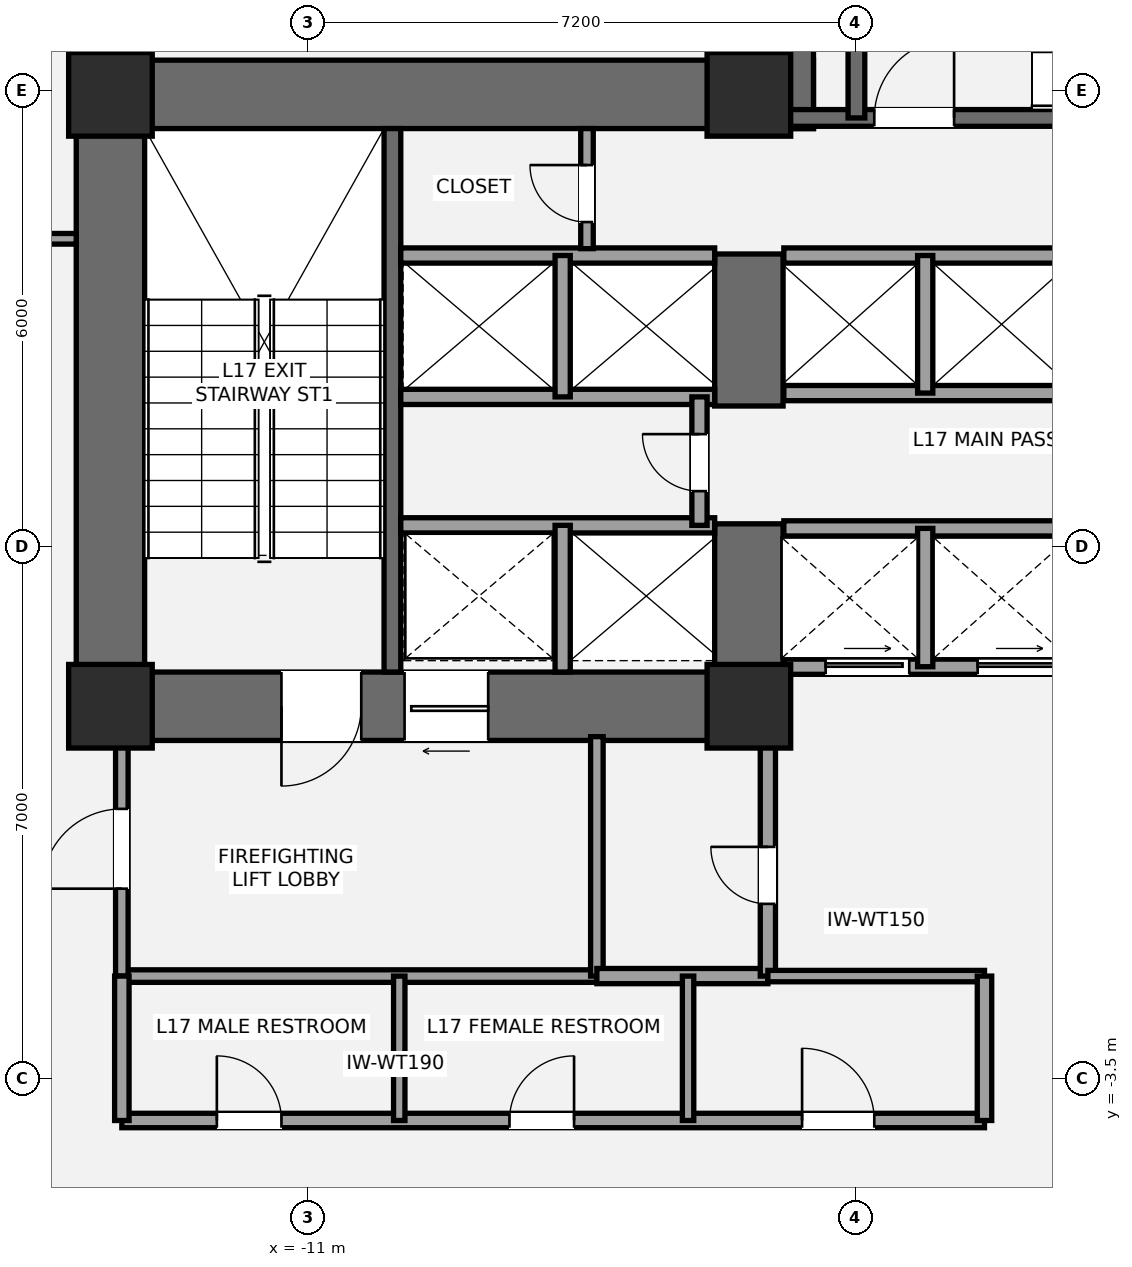
"""IFC4 building model, lengths in metres.
Left out: names, types, materials, properties, quantities, classifications, styles, units other than length and angle.
Written with IfcOpenShell. Run it as: python <this file> out.ifc"""

import sys

from ifc_helpers import new_model, si_unit, direction, frame, frame_2d, origin, origin_2d, place, context, subcontext, project, spatial, rectangle, extrude, element, fill, save


model = new_model("IFC4")
c1 = context("Model", 3, precision=1e-05, world=origin(), true_north=direction((0.0, 1.0)))
c2 = subcontext(c1, "Body", "Model", "MODEL_VIEW")
j1 = project(units=[si_unit("LENGTHUNIT", "METRE"), si_unit("PLANEANGLEUNIT", "RADIAN")], contexts=[c1])
p1 = place(None, origin())
s1 = spatial("IfcSite", under=j1, at=p1, CompositionType="ELEMENT")
p2 = place(p1, origin())
s2 = spatial("IfcBuilding", under=s1, at=p2, CompositionType="ELEMENT")
p3 = place(p2, frame((0.0, 0.0, 66.6)))
s3 = spatial("IfcBuildingStorey", under=s2, at=p3, CompositionType="ELEMENT", Elevation=66.6)
p4 = place(p3, frame((-13.6, 0.95, 0.0), z_axis=(0.0, 0.0, 1.0), x_axis=(0.0, 1.0, 0.0)))
e1 = element("IfcWall", 1, at=p4, inside=s3, PredefinedType="SHEAR", context=c2, shape_type="SweptSolid", body=[
    extrude(rectangle(XDim=8.95, YDim=0.9, at=frame_2d((4.475, 0.0))), origin(), (0.0, 0.0, 1.0), 3.6),
])
p5 = place(p3, frame((-14.05, 9.45, 0.0), z_axis=(0.0, 0.0, 1.0), x_axis=(1.0, 0.0, 0.0)))
e2 = element("IfcWall", 2, at=p5, inside=s3, PredefinedType="SHEAR", context=c2, shape_type="SweptSolid", body=[
    extrude(rectangle(XDim=9.7, YDim=0.9, at=frame_2d((4.85, 0.0))), origin(), (0.0, 0.0, 1.0), 3.6),
])
p6 = place(p3, frame((-4.75, 1.4, 0.0), z_axis=(0.0, 0.0, 1.0), x_axis=(-1.0, 0.0, 0.0)))
e3 = element("IfcWall", 3, at=p6, inside=s3, PredefinedType="SHEAR", context=c2, shape_type="SweptSolid", body=[
    extrude(rectangle(XDim=9.3, YDim=0.9, at=frame_2d((4.65, 0.0))), origin(), (0.0, 0.0, 1.0), 3.6),
])
p7 = place(p6, frame((5.55, 0.0, 0.0)))
e4 = element("IfcOpeningElement", 4, at=p7, cuts=e3, PredefinedType="OPENING", context=c2, shape_type="SweptSolid", body=[
    extrude(rectangle(XDim=1.05, YDim=2.15, at=frame_2d((0.525, 1.075))), frame((0.0, 0.46, 0.0), z_axis=(0.0, -1.0, 0.0), x_axis=(1.0, 0.0, 0.0)), (0.0, 0.0, 1.0), 0.92),
])
p8 = place(p6, frame((3.88, 0.0, 0.0)))
e5 = element("IfcOpeningElement", 5, at=p8, cuts=e3, PredefinedType="OPENING", context=c2, shape_type="SweptSolid", body=[
    extrude(rectangle(XDim=1.1, YDim=2.2, at=frame_2d((0.55, 1.1))), frame((0.0, 0.46, 0.0), z_axis=(0.0, -1.0, 0.0), x_axis=(1.0, 0.0, 0.0)), (0.0, 0.0, 1.0), 0.92),
])
p9 = place(p3, frame((-5.2, 0.95, 0.0), z_axis=(0.0, 0.0, 1.0), x_axis=(0.0, 1.0, 0.0)))
e6 = element("IfcWall", 6, at=p9, inside=s3, PredefinedType="SHEAR", context=c2, shape_type="SweptSolid", body=[
    extrude(rectangle(XDim=2.85, YDim=0.9, at=frame_2d((1.425, 0.0))), origin(), (0.0, 0.0, 1.0), 3.6),
])
p10 = place(p3, frame((-5.2, 5.35, 0.0), z_axis=(0.0, 0.0, 1.0), x_axis=(0.0, 1.0, 0.0)))
e7 = element("IfcWall", 7, at=p10, inside=s3, PredefinedType="SHEAR", context=c2, shape_type="SweptSolid", body=[
    extrude(rectangle(XDim=2.0, YDim=0.9, at=frame_2d((1.0, 0.0))), origin(), (0.0, 0.0, 1.0), 3.6),
])
p11 = place(p3, frame((-9.89, 1.85, 0.0), z_axis=(0.0, 0.0, 1.0), x_axis=(0.0, 1.0, 0.0)))
e8 = element("IfcWall", 8, at=p11, inside=s3, PredefinedType="SHEAR", context=c2, shape_type="SweptSolid", body=[
    extrude(rectangle(XDim=7.15, YDim=0.22, at=frame_2d((3.575, 0.0))), origin(), (0.0, 0.0, 1.0), 3.6),
])
p12 = place(p3, frame((-4.8, 9.0, 0.0), z_axis=(0.0, 0.0, 1.0), x_axis=(0.0, 1.0, 0.0)))
e9 = element("IfcWall", 9, at=p12, inside=s3, PredefinedType="SHEAR", context=c2, shape_type="SweptSolid", body=[
    extrude(rectangle(XDim=4.3, YDim=0.9, at=frame_2d((2.15, 0.0))), origin(), (0.0, 0.0, 1.0), 3.6),
])
p13 = place(p3, frame((-4.7, 9.14, 0.0), z_axis=(0.0, 0.0, 1.0), x_axis=(1.0, 0.0, 0.0)))
e10 = element("IfcWall", 10, at=p13, inside=s3, PredefinedType="SHEAR", context=c2, shape_type="SweptSolid", body=[
    extrude(rectangle(XDim=9.3, YDim=0.22, at=frame_2d((4.65, 0.0))), origin(), (0.0, 0.0, 1.0), 3.6),
])
p14 = place(p13, frame((1.15, 0.0, 0.0)))
e11 = element("IfcOpeningElement", 11, at=p14, cuts=e10, PredefinedType="OPENING", context=c2, shape_type="SweptSolid", body=[
    extrude(rectangle(XDim=1.05, YDim=2.15, at=frame_2d((0.525, 1.075))), frame((0.0, 0.12, 0.0), z_axis=(0.0, -1.0, 0.0), x_axis=(1.0, 0.0, 0.0)), (0.0, 0.0, 1.0), 0.24),
])
p15 = place(p3, frame((-3.785, 9.14, 0.0), z_axis=(0.0, 0.0, 1.0), x_axis=(0.0, 1.0, 0.0)))
e12 = element("IfcWall", 12, at=p15, inside=s3, PredefinedType="SHEAR", context=c2, shape_type="SweptSolid", body=[
    extrude(rectangle(XDim=3.26, YDim=0.22, at=frame_2d((1.63, 0.0))), origin(), (0.0, 0.0, 1.0), 3.6),
])
for number, where, z_axis, x_axis in (
    (13, (-13.6, 1.4, 0.0), (0.0, 0.0, 1.0), (1.0, 0.0, 0.0)),
    (14, (-13.6, 9.45, 0.0), (0.0, 0.0, 1.0), (1.0, 0.0, 0.0)),
    (15, (-5.2, 1.4, 0.0), (0.0, 0.0, 1.0), (1.0, 0.0, 0.0)),
    (16, (-5.2, 9.45, 0.0), (0.0, 0.0, 1.0), (1.0, 0.0, 0.0)),
):
    element("IfcColumn", number, at=place(p3, frame(where, z_axis=z_axis, x_axis=x_axis)), inside=s3, PredefinedType="COLUMN", context=c2, shape_type="SweptSolid", body=[
        extrude(rectangle(XDim=1.1, YDim=1.1, at=origin_2d()), origin(), (0.0, 0.0, 1.0), 3.6),
    ])
p16 = place(p3, frame((-13.45, -2.15, 0.0), z_axis=(0.0, 0.0, 1.0), x_axis=(1.0, 0.0, 0.0)))
e17 = element("IfcWall", 17, at=p16, inside=s3, PredefinedType="PARTITIONING", context=c2, shape_type="SweptSolid", body=[
    extrude(rectangle(XDim=6.25, YDim=0.165, at=frame_2d((3.125, 0.0))), origin(), (0.0, 0.0, 1.0), 3.4),
])
p17 = place(p3, frame((-13.45, -2.15, 0.0), z_axis=(0.0, 0.0, 1.0), x_axis=(0.0, 1.0, 0.0)))
e18 = element("IfcWall", 18, at=p17, inside=s3, PredefinedType="PARTITIONING", context=c2, shape_type="SweptSolid", body=[
    extrude(rectangle(XDim=3.15, YDim=0.165, at=frame_2d((1.575, 0.0))), origin(), (0.0, 0.0, 1.0), 2.853),
])
p18 = place(p17, frame((1.15, 0.0, 0.0)))
e19 = element("IfcOpeningElement", 19, at=p18, cuts=e18, PredefinedType="OPENING", context=c2, shape_type="SweptSolid", body=[
    extrude(rectangle(XDim=1.05, YDim=2.15, at=frame_2d((0.525, 1.075))), frame((0.0, 0.093, 0.0), z_axis=(0.0, -1.0, 0.0), x_axis=(1.0, 0.0, 0.0)), (0.0, 0.0, 1.0), 0.185),
])
p19 = place(p3, frame((-7.2, -2.15, 0.0), z_axis=(0.0, 0.0, 1.0), x_axis=(0.0, 1.0, 0.0)))
e20 = element("IfcWall", 20, at=p19, inside=s3, PredefinedType="PARTITIONING", context=c2, shape_type="SweptSolid", body=[
    extrude(rectangle(XDim=3.15, YDim=0.165, at=frame_2d((1.575, 0.0))), origin(), (0.0, 0.0, 1.0), 3.4),
])
p20 = place(p3, frame((-7.2, -2.15, 0.0), z_axis=(0.0, 0.0, 1.0), x_axis=(1.0, 0.0, 0.0)))
e21 = element("IfcWall", 21, at=p20, inside=s3, PredefinedType="SOLIDWALL", context=c2, shape_type="SweptSolid", body=[
    extrude(rectangle(XDim=2.25, YDim=0.2, at=frame_2d((1.125, 0.0))), origin(), (0.0, 0.0, 1.0), 3.4),
])
p21 = place(p3, frame((-4.95, -2.15, 0.0), z_axis=(0.0, 0.0, 1.0), x_axis=(0.0, 1.0, 0.0)))
e22 = element("IfcWall", 22, at=p21, inside=s3, PredefinedType="SOLIDWALL", context=c2, shape_type="SweptSolid", body=[
    extrude(rectangle(XDim=3.15, YDim=0.2, at=frame_2d((1.575, 0.0))), origin(), (0.0, 0.0, 1.0), 2.853),
])
p22 = place(p21, frame((0.95, 0.0, 0.0)))
e23 = element("IfcOpeningElement", 23, at=p22, cuts=e22, PredefinedType="OPENING", context=c2, shape_type="SweptSolid", body=[
    extrude(rectangle(XDim=0.75, YDim=2.1, at=frame_2d((0.375, 1.05))), frame((0.0, 0.11, 0.0), z_axis=(0.0, -1.0, 0.0), x_axis=(1.0, 0.0, 0.0)), (0.0, 0.0, 1.0), 0.22),
])
p23 = place(p3, frame((-9.78, 3.78, 0.0), z_axis=(0.0, 0.0, 1.0), x_axis=(1.0, 0.0, 0.0)))
e24 = element("IfcWall", 24, at=p23, inside=s3, PredefinedType="SOLIDWALL", context=c2, shape_type="SweptSolid", body=[
    extrude(rectangle(XDim=4.13, YDim=0.2, at=frame_2d((2.065, 0.0))), origin(), (0.0, 0.0, 1.0), 3.4),
])
p24 = place(p3, frame((-7.65, 1.85, 0.0), z_axis=(0.0, 0.0, 1.0), x_axis=(0.0, 1.0, 0.0)))
e25 = element("IfcWall", 25, at=p24, inside=s3, PredefinedType="SOLIDWALL", context=c2, shape_type="SweptSolid", body=[
    extrude(rectangle(XDim=1.93, YDim=0.2, at=frame_2d((0.965, 0.0))), origin(), (0.0, 0.0, 1.0), 3.4),
])
for number, where, z_axis, x_axis in (
    (26, (-9.78, 5.47, 0.0), (0.0, 0.0, 1.0), (1.0, 0.0, 0.0)),
    (27, (-9.78, 7.33, 0.0), (0.0, 0.0, 1.0), (1.0, 0.0, 0.0)),
):
    element("IfcWall", number, at=place(p3, frame(where, z_axis=z_axis, x_axis=x_axis)), inside=s3, PredefinedType="SOLIDWALL", context=c2, shape_type="SweptSolid", body=[
        extrude(rectangle(XDim=4.13, YDim=0.2, at=frame_2d((2.065, 0.0))), origin(), (0.0, 0.0, 1.0), 3.4),
    ])
p25 = place(p3, frame((-7.65, 5.47, 0.0), z_axis=(0.0, 0.0, 1.0), x_axis=(0.0, 1.0, 0.0)))
e28 = element("IfcWall", 28, at=p25, inside=s3, PredefinedType="SOLIDWALL", context=c2, shape_type="SweptSolid", body=[
    extrude(rectangle(XDim=1.86, YDim=0.2, at=frame_2d((0.93, 0.0))), origin(), (0.0, 0.0, 1.0), 3.4),
])
p26 = place(p3, frame((-5.85, 3.78, 0.0), z_axis=(0.0, 0.0, 1.0), x_axis=(0.0, 1.0, 0.0)))
e29 = element("IfcWall", 29, at=p26, inside=s3, PredefinedType="SOLIDWALL", context=c2, shape_type="SweptSolid", body=[
    extrude(rectangle(XDim=1.69, YDim=0.2, at=frame_2d((0.845, 0.0))), origin(), (0.0, 0.0, 1.0), 3.4),
])
p27 = place(p26, frame((0.45, 0.0, 0.0)))
e30 = element("IfcOpeningElement", 30, at=p27, cuts=e29, PredefinedType="OPENING", context=c2, shape_type="SweptSolid", body=[
    extrude(rectangle(XDim=0.75, YDim=2.1, at=frame_2d((0.375, 1.05))), frame((0.0, 0.11, 0.0), z_axis=(0.0, -1.0, 0.0), x_axis=(1.0, 0.0, 0.0)), (0.0, 0.0, 1.0), 0.22),
])
p28 = place(p3, frame((-4.74, 1.92, 0.0), z_axis=(0.0, 0.0, 1.0), x_axis=(1.0, 0.0, 0.0)))
e31 = element("IfcWall", 31, at=p28, inside=s3, PredefinedType="SOLIDWALL", context=c2, shape_type="SweptSolid", body=[
    extrude(rectangle(XDim=3.86, YDim=0.2, at=frame_2d((1.93, 0.0))), origin(), (0.0, 0.0, 1.0), 2.39),
])
p29 = place(p28, frame((0.55, 0.0, 0.0)))
e32 = element("IfcOpeningElement", 32, at=p29, cuts=e31, PredefinedType="OPENING", context=c2, shape_type="SweptSolid", body=[
    extrude(rectangle(XDim=1.1, YDim=2.2, at=frame_2d((0.55, 1.1))), frame((0.0, 0.11, 0.0), z_axis=(0.0, -1.0, 0.0), x_axis=(1.0, 0.0, 0.0)), (0.0, 0.0, 1.0), 0.22),
])
p30 = place(p28, frame((2.55, 0.0, 0.0)))
e33 = element("IfcOpeningElement", 33, at=p30, cuts=e31, PredefinedType="OPENING", context=c2, shape_type="SweptSolid", body=[
    extrude(rectangle(XDim=1.1, YDim=2.2, at=frame_2d((0.55, 1.1))), frame((0.0, 0.11, 0.0), z_axis=(0.0, -1.0, 0.0), x_axis=(1.0, 0.0, 0.0)), (0.0, 0.0, 1.0), 0.22),
])
p31 = place(p3, frame((-4.74, 3.74, 0.0), z_axis=(0.0, 0.0, 1.0), x_axis=(1.0, 0.0, 0.0)))
e34 = element("IfcWall", 34, at=p31, inside=s3, PredefinedType="SOLIDWALL", context=c2, shape_type="SweptSolid", body=[
    extrude(rectangle(XDim=3.86, YDim=0.2, at=frame_2d((1.93, 0.0))), origin(), (0.0, 0.0, 1.0), 3.4),
])
p32 = place(p3, frame((-2.88, 1.92, 0.0), z_axis=(0.0, 0.0, 1.0), x_axis=(0.0, 1.0, 0.0)))
e35 = element("IfcWall", 35, at=p32, inside=s3, PredefinedType="SOLIDWALL", context=c2, shape_type="SweptSolid", body=[
    extrude(rectangle(XDim=1.82, YDim=0.2, at=frame_2d((0.91, 0.0))), origin(), (0.0, 0.0, 1.0), 3.4),
])
for number, where, z_axis, x_axis in (
    (36, (-4.74, 5.52, 0.0), (0.0, 0.0, 1.0), (1.0, 0.0, 0.0)),
    (37, (-4.74, 7.33, 0.0), (0.0, 0.0, 1.0), (1.0, 0.0, 0.0)),
):
    element("IfcWall", number, at=place(p3, frame(where, z_axis=z_axis, x_axis=x_axis)), inside=s3, PredefinedType="SOLIDWALL", context=c2, shape_type="SweptSolid", body=[
        extrude(rectangle(XDim=3.86, YDim=0.2, at=frame_2d((1.93, 0.0))), origin(), (0.0, 0.0, 1.0), 3.4),
    ])
p33 = place(p3, frame((-2.88, 5.52, 0.0), z_axis=(0.0, 0.0, 1.0), x_axis=(0.0, 1.0, 0.0)))
e38 = element("IfcWall", 38, at=p33, inside=s3, PredefinedType="SOLIDWALL", context=c2, shape_type="SweptSolid", body=[
    extrude(rectangle(XDim=1.81, YDim=0.2, at=frame_2d((0.905, 0.0))), origin(), (0.0, 0.0, 1.0), 3.4),
])
p34 = place(p3, frame((-7.33, 7.42, 0.0), z_axis=(0.0, 0.0, 1.0), x_axis=(0.0, 1.0, 0.0)))
e39 = element("IfcWall", 39, at=p34, inside=s3, PredefinedType="PARTITIONING", context=c2, shape_type="SweptSolid", body=[
    extrude(rectangle(XDim=1.58, YDim=0.165, at=frame_2d((0.79, 0.0))), origin(), (0.0, 0.0, 1.0), 3.4),
])
p35 = place(p34, frame((0.35, 0.0, 0.0)))
e40 = element("IfcOpeningElement", 40, at=p35, cuts=e39, PredefinedType="OPENING", context=c2, shape_type="SweptSolid", body=[
    extrude(rectangle(XDim=0.75, YDim=2.1, at=frame_2d((0.375, 1.05))), frame((0.0, 0.093, 0.0), z_axis=(0.0, -1.0, 0.0), x_axis=(1.0, 0.0, 0.0)), (0.0, 0.0, 1.0), 0.185),
])
p36 = place(p3, frame((-13.45, -4.05, 0.0), z_axis=(0.0, 0.0, 1.0), x_axis=(1.0, 0.0, 0.0)))
e41 = element("IfcWall", 41, at=p36, inside=s3, PredefinedType="PLUMBINGWALL", context=c2, shape_type="SweptSolid", body=[
    extrude(rectangle(XDim=11.35, YDim=0.19, at=frame_2d((5.675, 0.0))), origin(), (0.0, 0.0, 1.0), 2.933),
])
p37 = place(p36, frame((1.25, 0.0, 0.0)))
e42 = element("IfcOpeningElement", 42, at=p37, cuts=e41, PredefinedType="OPENING", context=c2, shape_type="SweptSolid", body=[
    extrude(rectangle(XDim=0.85, YDim=2.1, at=frame_2d((0.425, 1.05))), frame((0.0, 0.105, 0.0), z_axis=(0.0, -1.0, 0.0), x_axis=(1.0, 0.0, 0.0)), (0.0, 0.0, 1.0), 0.21),
])
p38 = place(p36, frame((5.1, 0.0, 0.0)))
e43 = element("IfcOpeningElement", 43, at=p38, cuts=e41, PredefinedType="OPENING", context=c2, shape_type="SweptSolid", body=[
    extrude(rectangle(XDim=0.85, YDim=2.1, at=frame_2d((0.425, 1.05))), frame((0.0, 0.105, 0.0), z_axis=(0.0, -1.0, 0.0), x_axis=(1.0, 0.0, 0.0)), (0.0, 0.0, 1.0), 0.21),
])
p39 = place(p36, frame((8.95, 0.0, 0.0)))
e44 = element("IfcOpeningElement", 44, at=p39, cuts=e41, PredefinedType="OPENING", context=c2, shape_type="SweptSolid", body=[
    extrude(rectangle(XDim=0.95, YDim=2.15, at=frame_2d((0.475, 1.075))), frame((0.0, 0.105, 0.0), z_axis=(0.0, -1.0, 0.0), x_axis=(1.0, 0.0, 0.0)), (0.0, 0.0, 1.0), 0.21),
])
p40 = place(p3, frame((-4.95, -2.15, 0.0), z_axis=(0.0, 0.0, 1.0), x_axis=(1.0, 0.0, 0.0)))
e45 = element("IfcWall", 45, at=p40, inside=s3, PredefinedType="PLUMBINGWALL", context=c2, shape_type="SweptSolid", body=[
    extrude(rectangle(XDim=2.85, YDim=0.15, at=frame_2d((1.425, 0.0))), origin(), (0.0, 0.0, 1.0), 3.4),
])
p41 = place(p3, frame((-13.45, -4.05, 0.0), z_axis=(0.0, 0.0, 1.0), x_axis=(0.0, 1.0, 0.0)))
e46 = element("IfcWall", 46, at=p41, inside=s3, PredefinedType="PLUMBINGWALL", context=c2, shape_type="SweptSolid", body=[
    extrude(rectangle(XDim=1.9, YDim=0.19, at=frame_2d((0.95, 0.0))), origin(), (0.0, 0.0, 1.0), 2.853),
])
p42 = place(p3, frame((-2.1, -4.05, 0.0), z_axis=(0.0, 0.0, 1.0), x_axis=(0.0, 1.0, 0.0)))
e47 = element("IfcWall", 47, at=p42, inside=s3, PredefinedType="PLUMBINGWALL", context=c2, shape_type="SweptSolid", body=[
    extrude(rectangle(XDim=1.9, YDim=0.19, at=frame_2d((0.95, 0.0))), origin(), (0.0, 0.0, 1.0), 3.4),
])
p43 = place(p3, frame((-9.8, -4.05, 0.0), z_axis=(0.0, 0.0, 1.0), x_axis=(0.0, 1.0, 0.0)))
e48 = element("IfcWall", 48, at=p43, inside=s3, PredefinedType="PLUMBINGWALL", context=c2, shape_type="SweptSolid", body=[
    extrude(rectangle(XDim=1.9, YDim=0.15, at=frame_2d((0.95, 0.0))), origin(), (0.0, 0.0, 1.0), 3.4),
])
p44 = place(p3, frame((-6.0, -4.05, 0.0), z_axis=(0.0, 0.0, 1.0), x_axis=(0.0, 1.0, 0.0)))
e49 = element("IfcWall", 49, at=p44, inside=s3, PredefinedType="PLUMBINGWALL", context=c2, shape_type="SweptSolid", body=[
    extrude(rectangle(XDim=1.9, YDim=0.15, at=frame_2d((0.95, 0.0))), origin(), (0.0, 0.0, 1.0), 2.841),
])
p45 = place(p3, frame((-26.168, 7.55, 0.0), z_axis=(0.0, 0.0, 1.0), x_axis=(1.0, 0.0, 0.0)))
e50 = element("IfcWall", 50, at=p45, inside=s3, PredefinedType="PARTITIONING", context=c2, shape_type="SweptSolid", body=[
    extrude(rectangle(XDim=12.118, YDim=0.14, at=frame_2d((6.059, 0.0))), origin(), (0.0, 0.0, 1.0), 3.4),
])
p46 = place(p45, frame((1.856, 0.0, 0.0)))
e51 = element("IfcOpeningElement", 51, at=p46, cuts=e50, PredefinedType="OPENING", context=c2, shape_type="SweptSolid", body=[
    extrude(rectangle(XDim=0.92, YDim=2.15, at=frame_2d((0.46, 1.075))), frame((0.0, 0.08, 0.0), z_axis=(0.0, -1.0, 0.0), x_axis=(1.0, 0.0, 0.0)), (0.0, 0.0, 1.0), 0.16),
])
p47 = place(p7, origin())
e52 = element("IfcDoor", 52, at=p47, inside=s3, OperationType="SINGLE_SWING_RIGHT", PredefinedType="DOOR", context=c2, shape_type="SweptSolid", body=[
    extrude(rectangle(XDim=1.05, YDim=2.15, at=frame_2d((0.525, 1.075))), frame((0.0, 0.025, 0.0), z_axis=(0.0, -1.0, 0.0), x_axis=(1.0, 0.0, 0.0)), (0.0, 0.0, 1.0), 0.05),
])
fill(e4, e52)
p48 = place(p14, origin())
e53 = element("IfcDoor", 53, at=p48, inside=s3, OperationType="SINGLE_SWING_RIGHT", PredefinedType="DOOR", context=c2, shape_type="SweptSolid", body=[
    extrude(rectangle(XDim=1.05, YDim=2.15, at=frame_2d((0.525, 1.075))), frame((0.0, 0.025, 0.0), z_axis=(0.0, -1.0, 0.0), x_axis=(1.0, 0.0, 0.0)), (0.0, 0.0, 1.0), 0.05),
])
fill(e11, e53)
p49 = place(p18, origin())
e54 = element("IfcDoor", 54, at=p49, inside=s3, OperationType="SINGLE_SWING_LEFT", PredefinedType="DOOR", context=c2, shape_type="SweptSolid", body=[
    extrude(rectangle(XDim=1.05, YDim=2.15, at=frame_2d((0.525, 1.075))), frame((0.0, 0.025, 0.0), z_axis=(0.0, -1.0, 0.0), x_axis=(1.0, 0.0, 0.0)), (0.0, 0.0, 1.0), 0.05),
])
fill(e19, e54)
p50 = place(p22, origin())
e55 = element("IfcDoor", 55, at=p50, inside=s3, OperationType="SINGLE_SWING_RIGHT", PredefinedType="DOOR", context=c2, shape_type="SweptSolid", body=[
    extrude(rectangle(XDim=0.75, YDim=2.1, at=frame_2d((0.375, 1.05))), frame((0.0, 0.025, 0.0), z_axis=(0.0, -1.0, 0.0), x_axis=(1.0, 0.0, 0.0)), (0.0, 0.0, 1.0), 0.05),
])
fill(e23, e55)
p51 = place(p8, origin())
e56 = element("IfcDoor", 56, at=p51, inside=s3, OperationType="SLIDING_TO_LEFT", PredefinedType="DOOR", context=c2, shape_type="SweptSolid", body=[
    extrude(rectangle(XDim=1.1, YDim=2.2, at=frame_2d((0.55, 1.1))), frame((0.0, 0.025, 0.0), z_axis=(0.0, -1.0, 0.0), x_axis=(1.0, 0.0, 0.0)), (0.0, 0.0, 1.0), 0.05),
])
fill(e5, e56)
p52 = place(p27, origin())
e57 = element("IfcDoor", 57, at=p52, inside=s3, OperationType="SINGLE_SWING_RIGHT", PredefinedType="DOOR", context=c2, shape_type="SweptSolid", body=[
    extrude(rectangle(XDim=0.75, YDim=2.1, at=frame_2d((0.375, 1.05))), frame((0.0, 0.025, 0.0), z_axis=(0.0, -1.0, 0.0), x_axis=(1.0, 0.0, 0.0)), (0.0, 0.0, 1.0), 0.05),
])
fill(e30, e57)
p53 = place(p29, origin())
e58 = element("IfcDoor", 58, at=p53, inside=s3, OperationType="SLIDING_TO_LEFT", PredefinedType="DOOR", context=c2, shape_type="SweptSolid", body=[
    extrude(rectangle(XDim=1.1, YDim=2.2, at=frame_2d((0.55, 1.1))), frame((0.0, 0.025, 0.0), z_axis=(0.0, -1.0, 0.0), x_axis=(1.0, 0.0, 0.0)), (0.0, 0.0, 1.0), 0.05),
])
fill(e32, e58)
p54 = place(p30, origin())
e59 = element("IfcDoor", 59, at=p54, inside=s3, OperationType="SLIDING_TO_LEFT", PredefinedType="DOOR", context=c2, shape_type="SweptSolid", body=[
    extrude(rectangle(XDim=1.1, YDim=2.2, at=frame_2d((0.55, 1.1))), frame((0.0, 0.025, 0.0), z_axis=(0.0, -1.0, 0.0), x_axis=(1.0, 0.0, 0.0)), (0.0, 0.0, 1.0), 0.05),
])
fill(e33, e59)
p55 = place(p35, origin())
e60 = element("IfcDoor", 60, at=p55, inside=s3, OperationType="SINGLE_SWING_RIGHT", PredefinedType="DOOR", context=c2, shape_type="SweptSolid", body=[
    extrude(rectangle(XDim=0.75, YDim=2.1, at=frame_2d((0.375, 1.05))), frame((0.0, 0.025, 0.0), z_axis=(0.0, -1.0, 0.0), x_axis=(1.0, 0.0, 0.0)), (0.0, 0.0, 1.0), 0.05),
])
fill(e40, e60)
p56 = place(p37, origin())
e61 = element("IfcDoor", 61, at=p56, inside=s3, OperationType="SINGLE_SWING_LEFT", PredefinedType="DOOR", context=c2, shape_type="SweptSolid", body=[
    extrude(rectangle(XDim=0.85, YDim=2.1, at=frame_2d((0.425, 1.05))), frame((0.0, 0.025, 0.0), z_axis=(0.0, -1.0, 0.0), x_axis=(1.0, 0.0, 0.0)), (0.0, 0.0, 1.0), 0.05),
])
fill(e42, e61)
p57 = place(p38, origin())
e62 = element("IfcDoor", 62, at=p57, inside=s3, OperationType="SINGLE_SWING_RIGHT", PredefinedType="DOOR", context=c2, shape_type="SweptSolid", body=[
    extrude(rectangle(XDim=0.85, YDim=2.1, at=frame_2d((0.425, 1.05))), frame((0.0, 0.025, 0.0), z_axis=(0.0, -1.0, 0.0), x_axis=(1.0, 0.0, 0.0)), (0.0, 0.0, 1.0), 0.05),
])
fill(e43, e62)
p58 = place(p39, origin())
e63 = element("IfcDoor", 63, at=p58, inside=s3, OperationType="SINGLE_SWING_LEFT", PredefinedType="DOOR", context=c2, shape_type="SweptSolid", body=[
    extrude(rectangle(XDim=0.95, YDim=2.15, at=frame_2d((0.475, 1.075))), frame((0.0, 0.025, 0.0), z_axis=(0.0, -1.0, 0.0), x_axis=(1.0, 0.0, 0.0)), (0.0, 0.0, 1.0), 0.05),
])
fill(e44, e63)
save(model, sys.argv[1])
